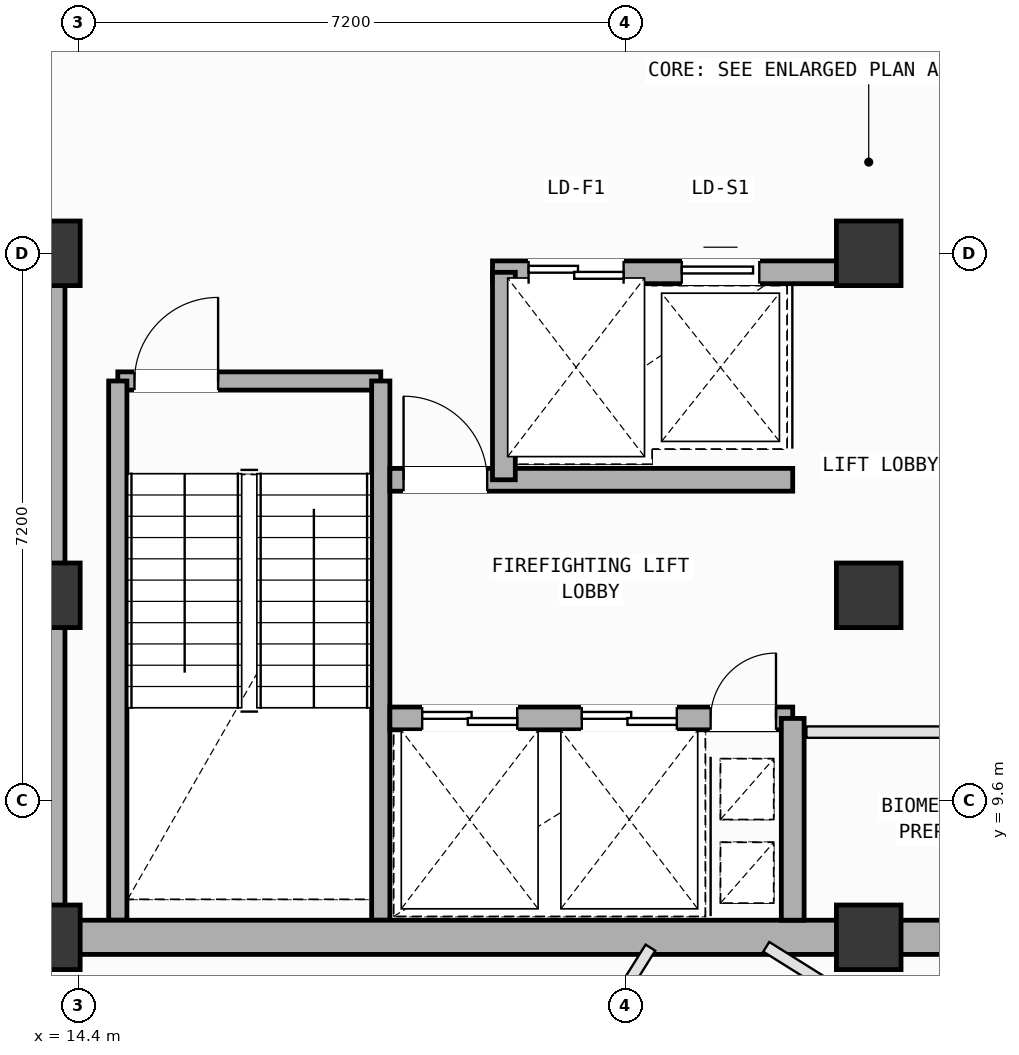
"""IFC4 building model, lengths in metres.
Left out: names, types, materials, properties, quantities, classifications, styles, units other than length and angle.
Written with IfcOpenShell. Run it as: python <this file> out.ifc"""

import sys

from ifc_helpers import new_model, si_unit, direction, frame, frame_2d, origin, origin_2d, place, context, subcontext, project, spatial, rectangle, extrude, element, fill, save


model = new_model("IFC4")
c1 = context("Model", 3, precision=1e-05, world=origin(), true_north=direction((0.0, 1.0)))
c2 = subcontext(c1, "Body", "Model", "MODEL_VIEW")
j1 = project(units=[si_unit("LENGTHUNIT", "METRE"), si_unit("PLANEANGLEUNIT", "RADIAN")], contexts=[c1])
p1 = place(None, origin())
s1 = spatial("IfcSite", under=j1, at=p1, CompositionType="ELEMENT")
p2 = place(p1, origin())
s2 = spatial("IfcBuilding", under=s1, at=p2, CompositionType="ELEMENT")
p3 = place(p2, frame((0.0, 0.0, 272.6)))
s3 = spatial("IfcBuildingStorey", under=s2, at=p3, CompositionType="ELEMENT", Elevation=272.6)
for number, where, z_axis, x_axis in (
    (1, (14.0, 7.8, 0.0), (0.0, 0.0, 1.0), (1.0, 0.0, 0.0)),
    (2, (14.0, 12.3, 0.0), (0.0, 0.0, 1.0), (1.0, 0.0, 0.0)),
    (3, (14.0, 16.8, 0.0), (0.0, 0.0, 1.0), (1.0, 0.0, 0.0)),
    (4, (24.8, 7.8, 0.0), (0.0, 0.0, 1.0), (1.0, 0.0, 0.0)),
    (5, (24.8, 12.3, 0.0), (0.0, 0.0, 1.0), (1.0, 0.0, 0.0)),
    (6, (24.8, 16.8, 0.0), (0.0, 0.0, 1.0), (1.0, 0.0, 0.0)),
):
    element("IfcColumn", number, at=place(p3, frame(where, z_axis=z_axis, x_axis=x_axis)), inside=s3, PredefinedType="COLUMN", context=c2, shape_type="SweptSolid", body=[
        extrude(rectangle(XDim=0.85, YDim=0.85, at=origin_2d()), origin(), (0.0, 0.0, 1.0), 4.0),
    ])
p4 = place(p3, frame((19.055, 3.868, 0.0), z_axis=(0.0, 0.0, 1.0), x_axis=(-0.847586178769, 0.530657770658, 0.0)))
e7 = element("IfcWall", 7, at=p4, inside=s3, PredefinedType="SOLIDWALL", context=c2, shape_type="SweptSolid", body=[
    extrude(rectangle(XDim=6.96, YDim=0.24, at=frame_2d((3.48, 0.0))), origin(), (0.0, 0.0, 1.0), 2.765),
])
p5 = place(p4, frame((2.93, 0.0, 0.0)))
e8 = element("IfcOpeningElement", 8, at=p5, cuts=e7, PredefinedType="OPENING", context=c2, shape_type="SweptSolid", body=[
    extrude(rectangle(XDim=1.1, YDim=2.15, at=frame_2d((0.55, 1.075))), frame((0.0, 0.13, 0.0), z_axis=(0.0, -1.0, 0.0), x_axis=(1.0, 0.0, 0.0)), (0.0, 0.0, 1.0), 0.26),
])
p6 = place(p3, frame((25.08, 22.406, 0.0), z_axis=(0.0, 0.0, 1.0), x_axis=(0.847580141129, -0.530667414077, 0.0)))
e9 = element("IfcWall", 9, at=p6, inside=s3, PredefinedType="SOLIDWALL", context=c2, shape_type="SweptSolid", body=[
    extrude(rectangle(XDim=6.958, YDim=0.28, at=frame_2d((3.479, 0.0))), origin(), (0.0, 0.0, 1.0), 2.765),
])
p7 = place(p3, frame((14.92, 15.12, 0.0), z_axis=(0.0, 0.0, 1.0), x_axis=(1.0, 0.0, 0.0)))
e10 = element("IfcWall", 10, at=p7, inside=s3, PredefinedType="SOLIDWALL", context=c2, shape_type="SweptSolid", body=[
    extrude(rectangle(XDim=3.46, YDim=0.24, at=frame_2d((1.73, 0.0))), origin(), (0.0, 0.0, 1.0), 3.78),
])
p8 = place(p7, frame((0.22, 0.0, 0.0)))
e11 = element("IfcOpeningElement", 11, at=p8, cuts=e10, PredefinedType="OPENING", context=c2, shape_type="SweptSolid", body=[
    extrude(rectangle(XDim=1.1, YDim=2.15, at=frame_2d((0.55, 1.075))), frame((0.0, 0.13, 0.0), z_axis=(0.0, -1.0, 0.0), x_axis=(1.0, 0.0, 0.0)), (0.0, 0.0, 1.0), 0.26),
])
for number, where, z_axis, x_axis in (
    (12, (18.38, 15.12, 0.0), (0.0, 0.0, 1.0), (0.0, -1.0, 0.0)),
    (13, (14.92, 8.025, 0.0), (0.0, 0.0, 1.0), (0.0, 1.0, 0.0)),
):
    element("IfcWall", number, at=place(p3, frame(where, z_axis=z_axis, x_axis=x_axis)), inside=s3, PredefinedType="SOLIDWALL", context=c2, shape_type="SweptSolid", body=[
        extrude(rectangle(XDim=7.095, YDim=0.24, at=frame_2d((3.548, 0.0))), origin(), (0.0, 0.0, 1.0), 3.78),
    ])
for number, where, z_axis, x_axis in (
    (14, (14.0, 7.8, 0.0), (0.0, 0.0, 1.0), (1.0, 0.0, 0.0)),
    (15, (24.8, 7.8, 0.0), (0.0, 0.0, 1.0), (1.0, 0.0, 0.0)),
):
    element("IfcWall", number, at=place(p3, frame(where, z_axis=z_axis, x_axis=x_axis)), inside=s3, PredefinedType="SHEAR", context=c2, shape_type="SweptSolid", body=[
        extrude(rectangle(XDim=10.8, YDim=0.45, at=frame_2d((5.4, 0.0))), origin(), (0.0, 0.0, 1.0), 3.78),
    ])
p9 = place(p3, frame((14.0, 16.8, 0.0), z_axis=(0.0, 0.0, 1.0), x_axis=(0.0, -1.0, 0.0)))
e16 = element("IfcWall", 16, at=p9, inside=s3, PredefinedType="SHEAR", context=c2, shape_type="SweptSolid", body=[
    extrude(rectangle(XDim=9.0, YDim=0.45, at=frame_2d((4.5, 0.0))), origin(), (0.0, 0.0, 1.0), 3.78),
])
p10 = place(p3, frame((19.85, 16.55, 0.0), z_axis=(0.0, 0.0, 1.0), x_axis=(1.0, 0.0, 0.0)))
e17 = element("IfcWall", 17, at=p10, inside=s3, PredefinedType="SOLIDWALL", context=c2, shape_type="SweptSolid", body=[
    extrude(rectangle(XDim=4.525, YDim=0.3, at=frame_2d((2.262, 0.0))), origin(), (0.0, 0.0, 1.0), 3.78),
])
p11 = place(p10, frame((0.475, 0.0, 0.0)))
e18 = element("IfcOpeningElement", 18, at=p11, cuts=e17, PredefinedType="OPENING", context=c2, shape_type="SweptSolid", body=[
    extrude(rectangle(XDim=1.25, YDim=2.18, at=frame_2d((0.625, 1.09))), frame((0.0, 0.16, 0.0), z_axis=(0.0, -1.0, 0.0), x_axis=(1.0, 0.0, 0.0)), (0.0, 0.0, 1.0), 0.32),
])
p12 = place(p10, frame((2.49, 0.0, 0.0)))
e19 = element("IfcOpeningElement", 19, at=p12, cuts=e17, PredefinedType="OPENING", context=c2, shape_type="SweptSolid", body=[
    extrude(rectangle(XDim=1.02, YDim=2.12, at=frame_2d((0.51, 1.06))), frame((0.0, 0.16, 0.0), z_axis=(0.0, -1.0, 0.0), x_axis=(1.0, 0.0, 0.0)), (0.0, 0.0, 1.0), 0.32),
])
p13 = place(p3, frame((18.5, 10.68, 0.0), z_axis=(0.0, 0.0, 1.0), x_axis=(1.0, 0.0, 0.0)))
e20 = element("IfcWall", 20, at=p13, inside=s3, PredefinedType="SOLIDWALL", context=c2, shape_type="SweptSolid", body=[
    extrude(rectangle(XDim=5.3, YDim=0.3, at=frame_2d((2.65, 0.0))), origin(), (0.0, 0.0, 1.0), 3.78),
])
p14 = place(p13, frame((4.22, 0.0, 0.0)))
e21 = element("IfcOpeningElement", 21, at=p14, cuts=e20, PredefinedType="OPENING", context=c2, shape_type="SweptSolid", body=[
    extrude(rectangle(XDim=0.86, YDim=2.06, at=frame_2d((0.43, 1.03))), frame((0.0, 0.16, 0.0), z_axis=(0.0, -1.0, 0.0), x_axis=(1.0, 0.0, 0.0)), (0.0, 0.0, 1.0), 0.32),
])
p15 = place(p13, frame((0.425, 0.0, 0.0)))
e22 = element("IfcOpeningElement", 22, at=p15, cuts=e20, PredefinedType="OPENING", context=c2, shape_type="SweptSolid", body=[
    extrude(rectangle(XDim=1.25, YDim=2.18, at=frame_2d((0.625, 1.09))), frame((0.0, 0.16, 0.0), z_axis=(0.0, -1.0, 0.0), x_axis=(1.0, 0.0, 0.0)), (0.0, 0.0, 1.0), 0.32),
])
p16 = place(p13, frame((2.525, 0.0, 0.0)))
e23 = element("IfcOpeningElement", 23, at=p16, cuts=e20, PredefinedType="OPENING", context=c2, shape_type="SweptSolid", body=[
    extrude(rectangle(XDim=1.25, YDim=2.18, at=frame_2d((0.625, 1.09))), frame((0.0, 0.16, 0.0), z_axis=(0.0, -1.0, 0.0), x_axis=(1.0, 0.0, 0.0)), (0.0, 0.0, 1.0), 0.32),
])
p17 = place(p3, frame((18.5, 13.82, 0.0), z_axis=(0.0, 0.0, 1.0), x_axis=(1.0, 0.0, 0.0)))
e24 = element("IfcWall", 24, at=p17, inside=s3, PredefinedType="SOLIDWALL", context=c2, shape_type="SweptSolid", body=[
    extrude(rectangle(XDim=5.3, YDim=0.3, at=frame_2d((2.65, 0.0))), origin(), (0.0, 0.0, 1.0), 3.78),
])
p18 = place(p17, frame((0.18, 0.0, 0.0)))
e25 = element("IfcOpeningElement", 25, at=p18, cuts=e24, PredefinedType="OPENING", context=c2, shape_type="SweptSolid", body=[
    extrude(rectangle(XDim=1.1, YDim=2.15, at=frame_2d((0.55, 1.075))), frame((0.0, 0.16, 0.0), z_axis=(0.0, -1.0, 0.0), x_axis=(1.0, 0.0, 0.0)), (0.0, 0.0, 1.0), 0.32),
])
p19 = place(p3, frame((23.8, 8.025, 0.0), z_axis=(0.0, 0.0, 1.0), x_axis=(0.0, 1.0, 0.0)))
e26 = element("IfcWall", 26, at=p19, inside=s3, PredefinedType="SOLIDWALL", context=c2, shape_type="SweptSolid", body=[
    extrude(rectangle(XDim=2.655, YDim=0.3, at=frame_2d((1.328, 0.0))), origin(), (0.0, 0.0, 1.0), 3.78),
])
p20 = place(p3, frame((20.0, 13.82, 0.0), z_axis=(0.0, 0.0, 1.0), x_axis=(0.0, 1.0, 0.0)))
e27 = element("IfcWall", 27, at=p20, inside=s3, PredefinedType="SOLIDWALL", context=c2, shape_type="SweptSolid", body=[
    extrude(rectangle(XDim=2.73, YDim=0.3, at=frame_2d((1.365, 0.0))), origin(), (0.0, 0.0, 1.0), 3.78),
])
p21 = place(p3, frame((23.98, 10.5, 0.0), z_axis=(0.0, 0.0, 1.0), x_axis=(1.0, 0.0, 0.0)))
e28 = element("IfcWall", 28, at=p21, inside=s3, PredefinedType="PARTITIONING", context=c2, shape_type="SweptSolid", body=[
    extrude(rectangle(XDim=5.4, YDim=0.15, at=frame_2d((2.7, 0.0))), origin(), (0.0, 0.0, 1.0), 3.78),
])
p22 = place(p21, frame((3.703, 0.0, 0.0)))
e29 = element("IfcOpeningElement", 29, at=p22, cuts=e28, PredefinedType="OPENING", context=c2, shape_type="SweptSolid", body=[
    extrude(rectangle(XDim=0.86, YDim=2.06, at=frame_2d((0.43, 1.03))), frame((0.0, 0.085, 0.0), z_axis=(0.0, -1.0, 0.0), x_axis=(1.0, 0.0, 0.0)), (0.0, 0.0, 1.0), 0.17),
])
p23 = place(p3, frame((19.411, 3.645, 0.0), z_axis=(0.0, 0.0, 1.0), x_axis=(0.530785412047, 0.847506251515, 0.0)))
e30 = element("IfcWall", 30, at=p23, inside=s3, PredefinedType="PARTITIONING", context=c2, shape_type="SweptSolid", body=[
    extrude(rectangle(XDim=4.742, YDim=0.15, at=frame_2d((2.371, 0.0))), origin(), (0.0, 0.0, 1.0), 3.78),
])
p24 = place(p23, frame((1.844, 0.0, 0.0)))
e31 = element("IfcOpeningElement", 31, at=p24, cuts=e30, PredefinedType="OPENING", context=c2, shape_type="SweptSolid", body=[
    extrude(rectangle(XDim=0.86, YDim=2.06, at=frame_2d((0.43, 1.03))), frame((0.0, 0.085, 0.0), z_axis=(0.0, -1.0, 0.0), x_axis=(1.0, 0.0, 0.0)), (0.0, 0.0, 1.0), 0.17),
])
p25 = place(p3, frame((23.452, 7.675, 0.0), z_axis=(0.0, 0.0, 1.0), x_axis=(0.847604512147, -0.530628486786, 0.0)))
e32 = element("IfcWall", 32, at=p25, inside=s3, PredefinedType="PARTITIONING", context=c2, shape_type="SweptSolid", body=[
    extrude(rectangle(XDim=11.954, YDim=0.15, at=frame_2d((5.977, 0.0))), origin(), (0.0, 0.0, 1.0), 3.415),
])
p26 = place(p25, frame((5.867, 0.0, 0.0)))
e33 = element("IfcOpeningElement", 33, at=p26, cuts=e32, PredefinedType="OPENING", context=c2, shape_type="SweptSolid", body=[
    extrude(rectangle(XDim=0.86, YDim=2.06, at=frame_2d((0.43, 1.03))), frame((0.0, 0.085, 0.0), z_axis=(0.0, -1.0, 0.0), x_axis=(1.0, 0.0, 0.0)), (0.0, 0.0, 1.0), 0.17),
])
p27 = place(p8, origin())
e34 = element("IfcDoor", 34, at=p27, inside=s3, OperationType="SINGLE_SWING_RIGHT", PredefinedType="DOOR", context=c2, shape_type="SweptSolid", body=[
    extrude(rectangle(XDim=1.1, YDim=2.15, at=frame_2d((0.55, 1.075))), frame((0.0, 0.025, 0.0), z_axis=(0.0, -1.0, 0.0), x_axis=(1.0, 0.0, 0.0)), (0.0, 0.0, 1.0), 0.05),
])
fill(e11, e34)
p28 = place(p14, origin())
e35 = element("IfcDoor", 35, at=p28, inside=s3, OperationType="SINGLE_SWING_RIGHT", PredefinedType="DOOR", context=c2, shape_type="SweptSolid", body=[
    extrude(rectangle(XDim=0.86, YDim=2.06, at=frame_2d((0.43, 1.03))), frame((0.0, 0.025, 0.0), z_axis=(0.0, -1.0, 0.0), x_axis=(1.0, 0.0, 0.0)), (0.0, 0.0, 1.0), 0.05),
])
fill(e21, e35)
p29 = place(p18, origin())
e36 = element("IfcDoor", 36, at=p29, inside=s3, OperationType="SINGLE_SWING_LEFT", PredefinedType="DOOR", context=c2, shape_type="SweptSolid", body=[
    extrude(rectangle(XDim=1.1, YDim=2.15, at=frame_2d((0.55, 1.075))), frame((0.0, 0.025, 0.0), z_axis=(0.0, -1.0, 0.0), x_axis=(1.0, 0.0, 0.0)), (0.0, 0.0, 1.0), 0.05),
])
fill(e25, e36)
p30 = place(p15, origin())
e37 = element("IfcDoor", 37, at=p30, inside=s3, OperationType="DOUBLE_DOOR_SLIDING", PredefinedType="DOOR", context=c2, shape_type="SweptSolid", body=[
    extrude(rectangle(XDim=1.25, YDim=2.18, at=frame_2d((0.625, 1.09))), frame((0.0, 0.025, 0.0), z_axis=(0.0, -1.0, 0.0), x_axis=(1.0, 0.0, 0.0)), (0.0, 0.0, 1.0), 0.05),
])
fill(e22, e37)
p31 = place(p16, origin())
e38 = element("IfcDoor", 38, at=p31, inside=s3, OperationType="DOUBLE_DOOR_SLIDING", PredefinedType="DOOR", context=c2, shape_type="SweptSolid", body=[
    extrude(rectangle(XDim=1.25, YDim=2.18, at=frame_2d((0.625, 1.09))), frame((0.0, 0.025, 0.0), z_axis=(0.0, -1.0, 0.0), x_axis=(1.0, 0.0, 0.0)), (0.0, 0.0, 1.0), 0.05),
])
fill(e23, e38)
p32 = place(p11, origin())
e39 = element("IfcDoor", 39, at=p32, inside=s3, OperationType="DOUBLE_DOOR_SLIDING", PredefinedType="DOOR", context=c2, shape_type="SweptSolid", body=[
    extrude(rectangle(XDim=1.25, YDim=2.18, at=frame_2d((0.625, 1.09))), frame((0.0, 0.025, 0.0), z_axis=(0.0, -1.0, 0.0), x_axis=(1.0, 0.0, 0.0)), (0.0, 0.0, 1.0), 0.05),
])
fill(e18, e39)
p33 = place(p12, origin())
e40 = element("IfcDoor", 40, at=p33, inside=s3, OperationType="SLIDING_TO_LEFT", PredefinedType="DOOR", context=c2, shape_type="SweptSolid", body=[
    extrude(rectangle(XDim=1.02, YDim=2.12, at=frame_2d((0.51, 1.06))), frame((0.0, 0.025, 0.0), z_axis=(0.0, -1.0, 0.0), x_axis=(1.0, 0.0, 0.0)), (0.0, 0.0, 1.0), 0.05),
])
fill(e19, e40)
save(model, sys.argv[1])
